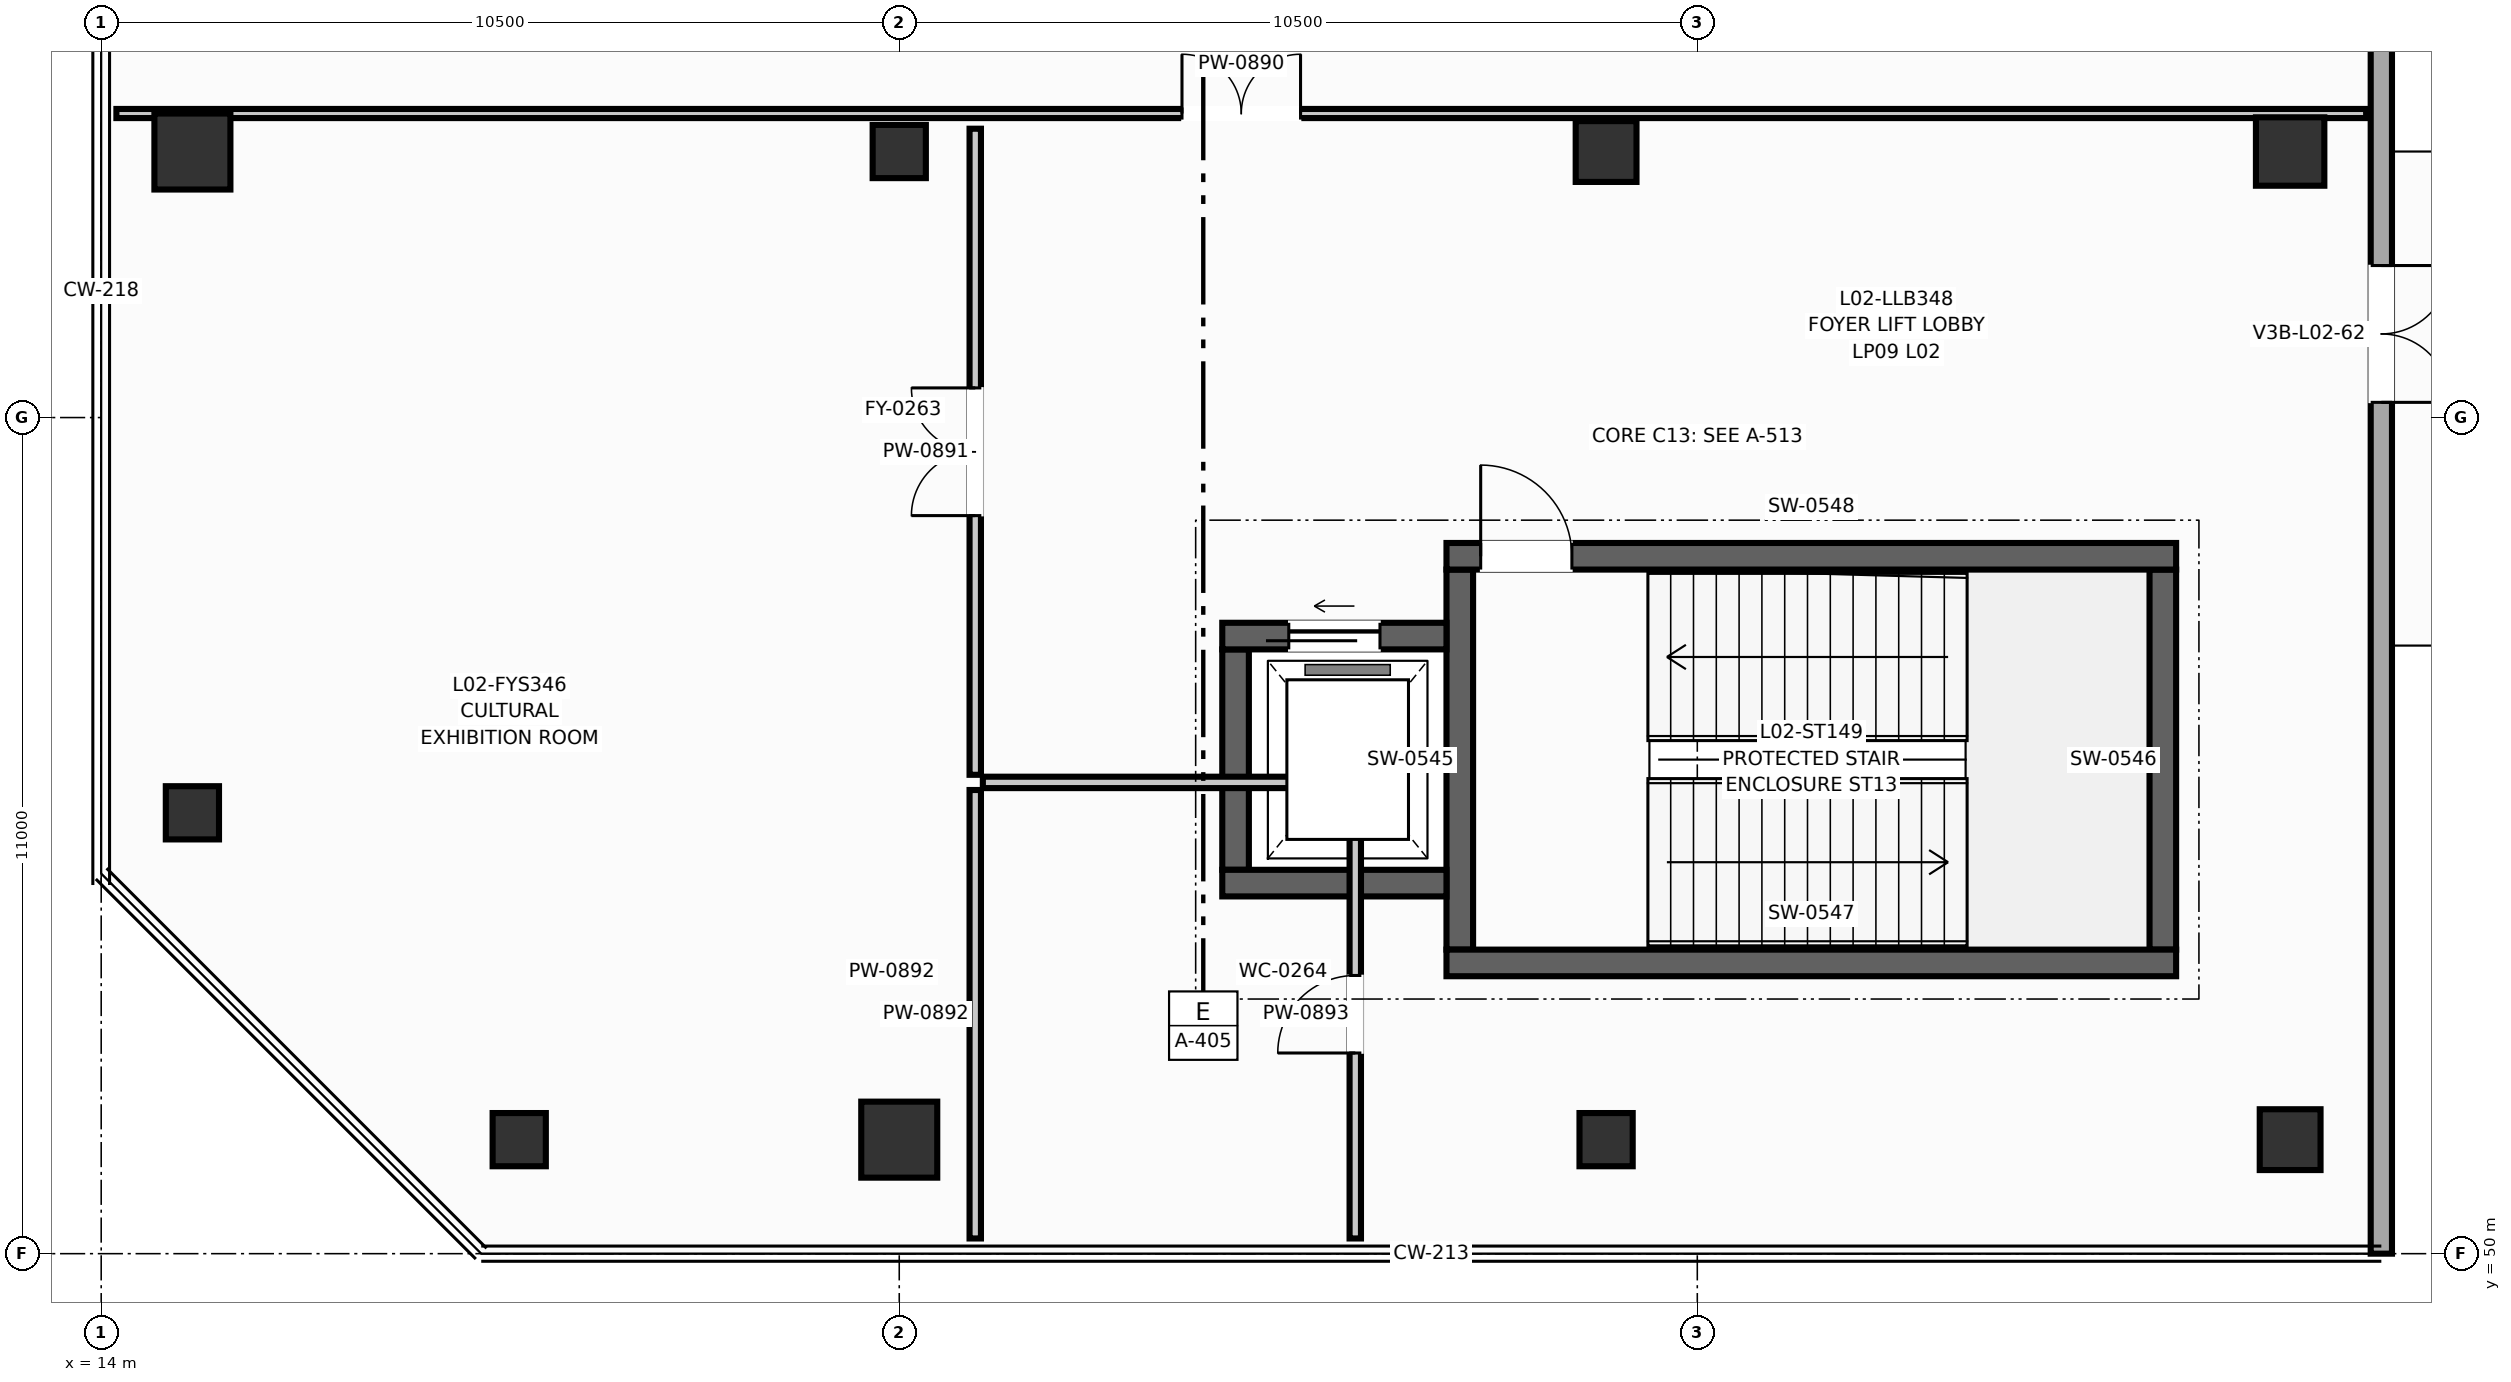
"""IFC4 building model, lengths in metres.
Left out: names, types, materials, properties, quantities, classifications, styles, units other than length and angle.
Written with IfcOpenShell. Run it as: python <this file> out.ifc"""

import sys

from ifc_helpers import new_model, si_unit, direction, frame, frame_2d, origin, origin_2d, place, context, subcontext, project, spatial, rectangle, circle, extrude, element, fill, save


model = new_model("IFC4")
c1 = context("Model", 3, precision=1e-05, world=origin(), true_north=direction((0.0, 1.0)))
c2 = subcontext(c1, "Body", "Model", "MODEL_VIEW")
j1 = project(units=[si_unit("LENGTHUNIT", "METRE"), si_unit("PLANEANGLEUNIT", "RADIAN")], contexts=[c1])
p1 = place(None, origin())
s1 = spatial("IfcSite", under=j1, at=p1, CompositionType="ELEMENT")
p2 = place(p1, origin())
s2 = spatial("IfcBuilding", under=s1, at=p2, CompositionType="ELEMENT")
p3 = place(p2, frame((0.0, 0.0, 9.0)))
s3 = spatial("IfcBuildingStorey", under=s2, at=p3, CompositionType="ELEMENT", Elevation=9.0)
for number, where, z_axis, x_axis in (
    (1, (15.2, 64.5, 0.0), (0.0, 0.0, 1.0), (1.0, 0.0, 0.0)),
    (2, (24.5, 51.5, 0.0), (0.0, 0.0, 1.0), (1.0, 0.0, 0.0)),
):
    element("IfcColumn", number, at=place(p3, frame(where, z_axis=z_axis, x_axis=x_axis)), inside=s3, PredefinedType="COLUMN", context=c2, shape_type="SweptSolid", body=[
        extrude(circle(Radius=0.5, at=origin_2d()), origin(), (0.0, 0.0, 1.0), 4.5),
    ])
for number, where, z_axis, x_axis in (
    (3, (24.5, 64.5, 0.0), (0.0, 0.0, 1.0), (1.0, 0.0, 0.0)),
    (4, (33.8, 51.5, 0.0), (0.0, 0.0, 1.0), (1.0, 0.0, 0.0)),
):
    element("IfcColumn", number, at=place(p3, frame(where, z_axis=z_axis, x_axis=x_axis)), inside=s3, PredefinedType="COLUMN", context=c2, shape_type="SweptSolid", body=[
        extrude(circle(Radius=0.35, at=origin_2d()), origin(), (0.0, 0.0, 1.0), 4.5),
    ])
for number, where, z_axis, x_axis in (
    (5, (33.8, 64.5, 0.0), (0.0, 0.0, 1.0), (1.0, 0.0, 0.0)),
    (6, (42.8, 51.5, 0.0), (0.0, 0.0, 1.0), (1.0, 0.0, 0.0)),
):
    element("IfcColumn", number, at=place(p3, frame(where, z_axis=z_axis, x_axis=x_axis)), inside=s3, PredefinedType="COLUMN", context=c2, shape_type="SweptSolid", body=[
        extrude(circle(Radius=0.4, at=origin_2d()), origin(), (0.0, 0.0, 1.0), 4.5),
    ])
p4 = place(p3, frame((42.8, 64.5, 0.0), z_axis=(0.0, 0.0, 1.0), x_axis=(1.0, 0.0, 0.0)))
e7 = element("IfcColumn", 7, at=p4, inside=s3, PredefinedType="COLUMN", context=c2, shape_type="SweptSolid", body=[
    extrude(circle(Radius=0.45, at=origin_2d()), origin(), (0.0, 0.0, 1.0), 4.5),
])
for number, where, z_axis, x_axis in (
    (8, (19.5, 51.5, 0.0), (0.0, 0.0, 1.0), (1.0, 0.0, 0.0)),
    (9, (15.2, 55.8, 0.0), (0.0, 0.0, 1.0), (1.0, 0.0, 0.0)),
):
    element("IfcColumn", number, at=place(p3, frame(where, z_axis=z_axis, x_axis=x_axis)), inside=s3, PredefinedType="COLUMN", context=c2, shape_type="SweptSolid", body=[
        extrude(circle(Radius=0.35, at=origin_2d()), origin(), (0.0, 0.0, 1.0), 4.5),
    ])
p5 = place(p3, frame((44.0, 50.0, 0.0), z_axis=(0.0, 0.0, 1.0), x_axis=(0.0, 1.0, 0.0)))
e10 = element("IfcWall", 10, at=p5, inside=s3, PredefinedType="SOLIDWALL", context=c2, shape_type="SweptSolid", body=[
    extrude(rectangle(XDim=56.0, YDim=0.28, at=frame_2d((28.0, 0.0))), origin(), (0.0, 0.0, 1.0), 3.55),
])
p6 = place(p5, frame((11.2, 0.0, 0.0)))
e11 = element("IfcOpeningElement", 11, at=p6, cuts=e10, PredefinedType="OPENING", context=c2, shape_type="SweptSolid", body=[
    extrude(rectangle(XDim=1.8, YDim=2.35, at=frame_2d((0.9, 1.175))), frame((0.0, 0.15, 0.0), z_axis=(0.0, -1.0, 0.0), x_axis=(1.0, 0.0, 0.0)), (0.0, 0.0, 1.0), 0.3),
])
p7 = place(p5, frame((43.0, 0.0, 0.0)))
e12 = element("IfcOpeningElement", 12, at=p7, cuts=e10, PredefinedType="OPENING", context=c2, shape_type="SweptSolid", body=[
    extrude(rectangle(XDim=1.8, YDim=2.35, at=frame_2d((0.9, 1.175))), frame((0.0, 0.15, 0.0), z_axis=(0.0, -1.0, 0.0), x_axis=(1.0, 0.0, 0.0)), (0.0, 0.0, 1.0), 0.3),
])
for number, where, z_axis, x_axis in (
    (13, (31.875, 54.0, 0.0), (0.0, 0.0, 1.0), (0.0, 1.0, 0.0)),
    (14, (41.125, 54.0, 0.0), (0.0, 0.0, 1.0), (0.0, 1.0, 0.0)),
):
    element("IfcWall", number, at=place(p3, frame(where, z_axis=z_axis, x_axis=x_axis)), inside=s3, PredefinedType="SHEAR", context=c2, shape_type="SweptSolid", body=[
        extrude(rectangle(XDim=5.0, YDim=0.35, at=frame_2d((2.5, 0.0))), origin(), (0.0, 0.0, 1.0), 4.185),
    ])
p8 = place(p3, frame((31.7, 53.825, 0.0), z_axis=(0.0, 0.0, 1.0), x_axis=(1.0, 0.0, 0.0)))
e15 = element("IfcWall", 15, at=p8, inside=s3, PredefinedType="SHEAR", context=c2, shape_type="SweptSolid", body=[
    extrude(rectangle(XDim=9.6, YDim=0.35, at=frame_2d((4.8, 0.0))), origin(), (0.0, 0.0, 1.0), 4.185),
])
p9 = place(p3, frame((31.7, 59.175, 0.0), z_axis=(0.0, 0.0, 1.0), x_axis=(1.0, 0.0, 0.0)))
e16 = element("IfcWall", 16, at=p9, inside=s3, PredefinedType="SHEAR", context=c2, shape_type="SweptSolid", body=[
    extrude(rectangle(XDim=9.6, YDim=0.35, at=frame_2d((4.8, 0.0))), origin(), (0.0, 0.0, 1.0), 4.185),
])
p10 = place(p9, frame((0.45, 0.0, 0.0)))
e17 = element("IfcOpeningElement", 17, at=p10, cuts=e16, PredefinedType="OPENING", context=c2, shape_type="SweptSolid", body=[
    extrude(rectangle(XDim=1.2, YDim=2.2, at=frame_2d((0.6, 1.1))), frame((0.0, 0.185, 0.0), z_axis=(0.0, -1.0, 0.0), x_axis=(1.0, 0.0, 0.0)), (0.0, 0.0, 1.0), 0.37),
])
p11 = place(p3, frame((28.925, 55.05, 0.0), z_axis=(0.0, 0.0, 1.0), x_axis=(0.0, 1.0, 0.0)))
e18 = element("IfcWall", 18, at=p11, inside=s3, PredefinedType="SHEAR", context=c2, shape_type="SweptSolid", body=[
    extrude(rectangle(XDim=2.9, YDim=0.35, at=frame_2d((1.45, 0.0))), origin(), (0.0, 0.0, 1.0), 4.185),
])
p12 = place(p3, frame((28.75, 54.875, 0.0), z_axis=(0.0, 0.0, 1.0), x_axis=(1.0, 0.0, 0.0)))
e19 = element("IfcWall", 19, at=p12, inside=s3, PredefinedType="SHEAR", context=c2, shape_type="SweptSolid", body=[
    extrude(rectangle(XDim=2.95, YDim=0.35, at=frame_2d((1.475, 0.0))), origin(), (0.0, 0.0, 1.0), 4.185),
])
p13 = place(p3, frame((28.75, 58.125, 0.0), z_axis=(0.0, 0.0, 1.0), x_axis=(1.0, 0.0, 0.0)))
e20 = element("IfcWall", 20, at=p13, inside=s3, PredefinedType="SHEAR", context=c2, shape_type="SweptSolid", body=[
    extrude(rectangle(XDim=2.95, YDim=0.35, at=frame_2d((1.475, 0.0))), origin(), (0.0, 0.0, 1.0), 4.185),
])
p14 = place(p13, frame((0.875, 0.0, 0.0)))
e21 = element("IfcOpeningElement", 21, at=p14, cuts=e20, PredefinedType="OPENING", context=c2, shape_type="SweptSolid", body=[
    extrude(rectangle(XDim=1.2, YDim=2.2, at=frame_2d((0.6, 1.1))), frame((0.0, 0.185, 0.0), z_axis=(0.0, -1.0, 0.0), x_axis=(1.0, 0.0, 0.0)), (0.0, 0.0, 1.0), 0.37),
])
p15 = place(p3, frame((14.2, 65.0, 0.0), z_axis=(0.0, 0.0, 1.0), x_axis=(1.0, 0.0, 0.0)))
e22 = element("IfcWall", 22, at=p15, inside=s3, PredefinedType="PARTITIONING", context=c2, shape_type="SweptSolid", body=[
    extrude(rectangle(XDim=29.6, YDim=0.12, at=frame_2d((14.8, 0.0))), origin(), (0.0, 0.0, 1.0), 3.22),
])
p16 = place(p15, frame((14.02, 0.0, 0.0)))
e23 = element("IfcOpeningElement", 23, at=p16, cuts=e22, PredefinedType="OPENING", context=c2, shape_type="SweptSolid", body=[
    extrude(rectangle(XDim=1.56, YDim=2.26, at=frame_2d((0.78, 1.13))), frame((0.0, 0.07, 0.0), z_axis=(0.0, -1.0, 0.0), x_axis=(1.0, 0.0, 0.0)), (0.0, 0.0, 1.0), 0.14),
])
p17 = place(p3, frame((25.5, 56.3, 0.0), z_axis=(0.0, 0.0, 1.0), x_axis=(0.0, 1.0, 0.0)))
e24 = element("IfcWall", 24, at=p17, inside=s3, PredefinedType="PARTITIONING", context=c2, shape_type="SweptSolid", body=[
    extrude(rectangle(XDim=8.5, YDim=0.15, at=frame_2d((4.25, 0.0))), origin(), (0.0, 0.0, 1.0), 3.22),
])
p18 = place(p17, frame((3.41, 0.0, 0.0)))
e25 = element("IfcOpeningElement", 25, at=p18, cuts=e24, PredefinedType="OPENING", context=c2, shape_type="SweptSolid", body=[
    extrude(rectangle(XDim=1.68, YDim=2.28, at=frame_2d((0.84, 1.14))), frame((0.0, 0.085, 0.0), z_axis=(0.0, -1.0, 0.0), x_axis=(1.0, 0.0, 0.0)), (0.0, 0.0, 1.0), 0.17),
])
p19 = place(p3, frame((25.5, 50.2, 0.0), z_axis=(0.0, 0.0, 1.0), x_axis=(0.0, 1.0, 0.0)))
e26 = element("IfcWall", 26, at=p19, inside=s3, PredefinedType="PARTITIONING", context=c2, shape_type="SweptSolid", body=[
    extrude(rectangle(XDim=5.9, YDim=0.15, at=frame_2d((2.95, 0.0))), origin(), (0.0, 0.0, 1.0), 3.22),
])
p20 = place(p3, frame((30.5, 50.2, 0.0), z_axis=(0.0, 0.0, 1.0), x_axis=(0.0, 1.0, 0.0)))
e27 = element("IfcWall", 27, at=p20, inside=s3, PredefinedType="PARTITIONING", context=c2, shape_type="SweptSolid", body=[
    extrude(rectangle(XDim=5.9, YDim=0.15, at=frame_2d((2.95, 0.0))), origin(), (0.0, 0.0, 1.0), 3.22),
])
p21 = place(p20, frame((2.44, 0.0, 0.0)))
e28 = element("IfcOpeningElement", 28, at=p21, cuts=e27, PredefinedType="OPENING", context=c2, shape_type="SweptSolid", body=[
    extrude(rectangle(XDim=1.02, YDim=2.15, at=frame_2d((0.51, 1.075))), frame((0.0, 0.085, 0.0), z_axis=(0.0, -1.0, 0.0), x_axis=(1.0, 0.0, 0.0)), (0.0, 0.0, 1.0), 0.17),
])
p22 = place(p3, frame((25.6, 56.2, 0.0), z_axis=(0.0, 0.0, 1.0), x_axis=(1.0, 0.0, 0.0)))
e29 = element("IfcWall", 29, at=p22, inside=s3, PredefinedType="PARTITIONING", context=c2, shape_type="SweptSolid", body=[
    extrude(rectangle(XDim=4.8, YDim=0.15, at=frame_2d((2.4, 0.0))), origin(), (0.0, 0.0, 1.0), 3.22),
])
p23 = place(p6, frame((1.8, 0.0, 0.0), z_axis=(0.0, 0.0, 1.0), x_axis=(-1.0, 0.0, 0.0)))
e30 = element("IfcDoor", 30, at=p23, inside=s3, OperationType="DOUBLE_DOOR_SINGLE_SWING", PredefinedType="DOOR", context=c2, shape_type="SweptSolid", body=[
    extrude(rectangle(XDim=1.8, YDim=2.35, at=frame_2d((0.9, 1.175))), frame((0.0, 0.025, 0.0), z_axis=(0.0, -1.0, 0.0), x_axis=(1.0, 0.0, 0.0)), (0.0, 0.0, 1.0), 0.05),
])
fill(e11, e30)
p24 = place(p10, origin())
e31 = element("IfcDoor", 31, at=p24, inside=s3, OperationType="SINGLE_SWING_LEFT", PredefinedType="DOOR", context=c2, shape_type="SweptSolid", body=[
    extrude(rectangle(XDim=1.2, YDim=2.2, at=frame_2d((0.6, 1.1))), frame((0.0, 0.025, 0.0), z_axis=(0.0, -1.0, 0.0), x_axis=(1.0, 0.0, 0.0)), (0.0, 0.0, 1.0), 0.05),
])
fill(e17, e31)
p25 = place(p14, origin())
e32 = element("IfcDoor", 32, at=p25, inside=s3, OperationType="SLIDING_TO_LEFT", PredefinedType="DOOR", context=c2, shape_type="SweptSolid", body=[
    extrude(rectangle(XDim=1.2, YDim=2.2, at=frame_2d((0.6, 1.1))), frame((0.0, 0.025, 0.0), z_axis=(0.0, -1.0, 0.0), x_axis=(1.0, 0.0, 0.0)), (0.0, 0.0, 1.0), 0.05),
])
fill(e21, e32)
p26 = place(p16, origin())
e33 = element("IfcDoor", 33, at=p26, inside=s3, OperationType="DOUBLE_DOOR_SINGLE_SWING", PredefinedType="DOOR", context=c2, shape_type="SweptSolid", body=[
    extrude(rectangle(XDim=1.56, YDim=2.26, at=frame_2d((0.78, 1.13))), frame((0.0, 0.025, 0.0), z_axis=(0.0, -1.0, 0.0), x_axis=(1.0, 0.0, 0.0)), (0.0, 0.0, 1.0), 0.05),
])
fill(e23, e33)
p27 = place(p18, origin())
e34 = element("IfcDoor", 34, at=p27, inside=s3, OperationType="DOUBLE_DOOR_SINGLE_SWING", PredefinedType="DOOR", context=c2, shape_type="SweptSolid", body=[
    extrude(rectangle(XDim=1.68, YDim=2.28, at=frame_2d((0.84, 1.14))), frame((0.0, 0.025, 0.0), z_axis=(0.0, -1.0, 0.0), x_axis=(1.0, 0.0, 0.0)), (0.0, 0.0, 1.0), 0.05),
])
fill(e25, e34)
p28 = place(p21, origin())
e35 = element("IfcDoor", 35, at=p28, inside=s3, OperationType="SINGLE_SWING_LEFT", PredefinedType="DOOR", context=c2, shape_type="SweptSolid", body=[
    extrude(rectangle(XDim=1.02, YDim=2.15, at=frame_2d((0.51, 1.075))), frame((0.0, 0.025, 0.0), z_axis=(0.0, -1.0, 0.0), x_axis=(1.0, 0.0, 0.0)), (0.0, 0.0, 1.0), 0.05),
])
fill(e28, e35)
save(model, sys.argv[1])
